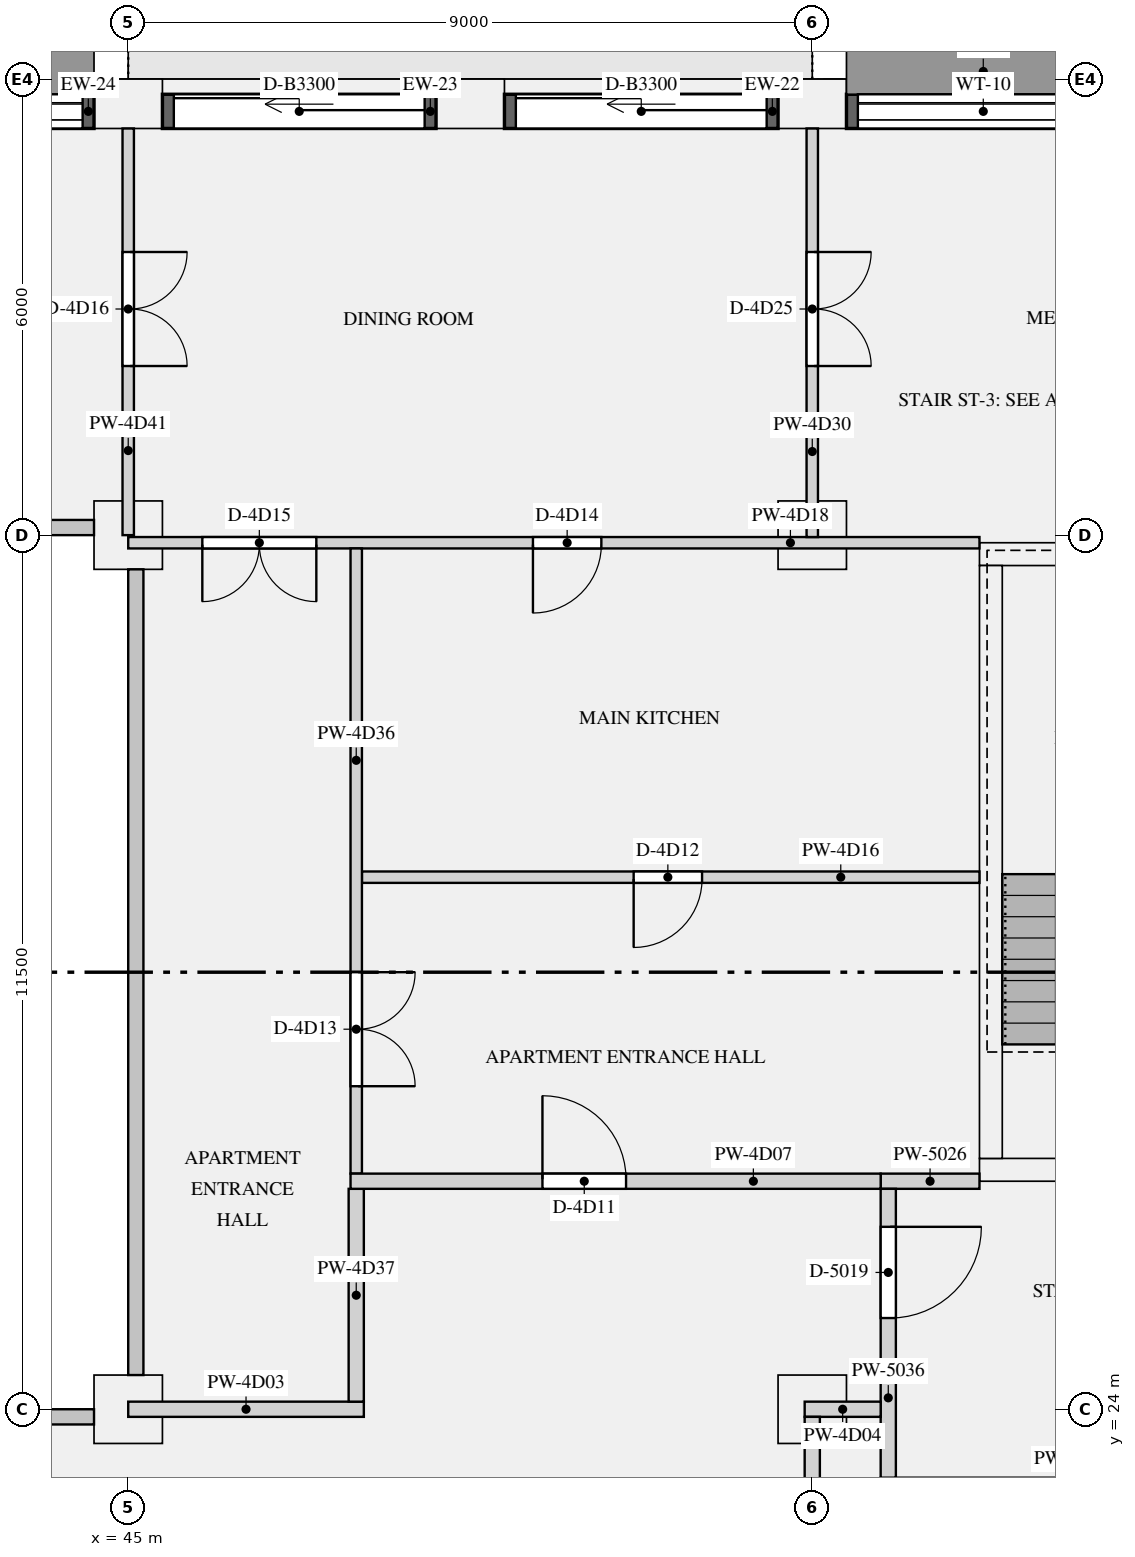
"""IFC4 building model, lengths in metres.
Left out: names, types, materials, properties, quantities, classifications, styles, units other than length and angle.
Written with IfcOpenShell. Run it as: python <this file> out.ifc"""

import sys

from ifc_helpers import new_model, si_unit, direction, frame, frame_2d, origin, origin_2d, place, context, subcontext, project, spatial, rectangle, extrude, element, fill, save


model = new_model("IFC4")
c1 = context("Model", 3, precision=1e-05, world=origin(), true_north=direction((0.0, 1.0)))
c2 = subcontext(c1, "Body", "Model", "MODEL_VIEW")
j1 = project(units=[si_unit("LENGTHUNIT", "METRE"), si_unit("PLANEANGLEUNIT", "RADIAN")], contexts=[c1])
p1 = place(None, origin())
s1 = spatial("IfcSite", under=j1, at=p1, CompositionType="ELEMENT")
p2 = place(p1, origin())
s2 = spatial("IfcBuilding", under=s1, at=p2, CompositionType="ELEMENT")
p3 = place(p2, frame((0.0, 0.0, 223.2)))
s3 = spatial("IfcBuildingStorey", under=s2, at=p3, CompositionType="ELEMENT", Elevation=223.2)
for number, where, z_axis, x_axis in (
    (1, (54.0, 41.175, 0.0), (0.0, 0.0, 1.0), (-1.0, 0.0, 0.0)),
    (2, (49.5, 41.175, 0.0), (0.0, 0.0, 1.0), (-1.0, 0.0, 0.0)),
    (3, (45.0, 41.175, 0.0), (0.0, 0.0, 1.0), (-1.0, 0.0, 0.0)),
):
    element("IfcColumn", number, at=place(p3, frame(where, z_axis=z_axis, x_axis=x_axis)), inside=s3, PredefinedType="USERDEFINED", context=c2, shape_type="SweptSolid", body=[
        extrude(rectangle(XDim=0.9, YDim=0.65, at=origin_2d()), origin(), (0.0, 0.0, 1.0), 3.15),
    ])
for number, where, z_axis, x_axis in (
    (4, (45.0, 24.0, 0.0), (0.0, 0.0, 1.0), (1.0, 0.0, 0.0)),
    (5, (54.0, 24.0, 0.0), (0.0, 0.0, 1.0), (1.0, 0.0, 0.0)),
    (6, (45.0, 35.5, 0.0), (0.0, 0.0, 1.0), (1.0, 0.0, 0.0)),
    (7, (54.0, 35.5, 0.0), (0.0, 0.0, 1.0), (1.0, 0.0, 0.0)),
):
    element("IfcColumn", number, at=place(p3, frame(where, z_axis=z_axis, x_axis=x_axis)), inside=s3, PredefinedType="COLUMN", context=c2, shape_type="SweptSolid", body=[
        extrude(rectangle(XDim=0.9, YDim=0.9, at=origin_2d()), origin(), (0.0, 0.0, 1.0), 3.15),
    ])
p4 = place(p3, frame((56.2, 27.15, 0.0), z_axis=(0.0, 0.0, 1.0), x_axis=(1.0, 0.0, 0.0)))
e8 = element("IfcWall", 8, at=p4, inside=s3, PredefinedType="SHEAR", context=c2, shape_type="SweptSolid", body=[
    extrude(rectangle(XDim=3.6, YDim=0.3, at=frame_2d((1.8, 0.0))), origin(), (0.0, 0.0, 1.0), 3.15),
])
p5 = place(p4, frame((1.25, 0.0, 0.0)))
e9 = element("IfcOpeningElement", 9, at=p5, cuts=e8, PredefinedType="OPENING", context=c2, shape_type="SweptSolid", body=[
    extrude(rectangle(XDim=1.1, YDim=2.1, at=frame_2d((0.55, 1.05))), frame((0.0, 0.16, 0.0), z_axis=(0.0, -1.0, 0.0), x_axis=(1.0, 0.0, 0.0)), (0.0, 0.0, 1.0), 0.32),
])
p6 = place(p3, frame((56.2, 35.25, 0.0), z_axis=(0.0, 0.0, 1.0), x_axis=(1.0, 0.0, 0.0)))
e10 = element("IfcWall", 10, at=p6, inside=s3, PredefinedType="SHEAR", context=c2, shape_type="SweptSolid", body=[
    extrude(rectangle(XDim=3.6, YDim=0.3, at=frame_2d((1.8, 0.0))), origin(), (0.0, 0.0, 1.0), 3.15),
])
p7 = place(p3, frame((56.35, 27.3, 0.0), z_axis=(0.0, 0.0, 1.0), x_axis=(0.0, 1.0, 0.0)))
e11 = element("IfcWall", 11, at=p7, inside=s3, PredefinedType="SHEAR", context=c2, shape_type="SweptSolid", body=[
    extrude(rectangle(XDim=7.8, YDim=0.3, at=frame_2d((3.9, 0.0))), origin(), (0.0, 0.0, 1.0), 3.15),
])
p8 = place(p3, frame((58.05, 41.075, 0.9), z_axis=(0.0, 0.0, 1.0), x_axis=(-1.0, 0.0, 0.0)))
e12 = element("IfcWall", 12, at=p8, inside=s3, PredefinedType="SOLIDWALL", context=c2, shape_type="SweptSolid", body=[
    extrude(rectangle(XDim=3.6, YDim=0.45, at=frame_2d((1.8, 0.0))), origin(), (0.0, 0.0, 1.0), 1.93),
])
p9 = place(p8, frame((0.15, 0.0, 0.15)))
e13 = element("IfcOpeningElement", 13, at=p9, cuts=e12, PredefinedType="OPENING", context=c2, shape_type="SweptSolid", body=[
    extrude(rectangle(XDim=3.3, YDim=1.5, at=frame_2d((1.65, 0.75))), frame((0.0, 0.235, 0.0), z_axis=(0.0, -1.0, 0.0), x_axis=(1.0, 0.0, 0.0)), (0.0, 0.0, 1.0), 0.47),
])
p10 = place(p3, frame((53.55, 41.075, 0.0), z_axis=(0.0, 0.0, 1.0), x_axis=(-1.0, 0.0, 0.0)))
e14 = element("IfcWall", 14, at=p10, inside=s3, PredefinedType="SOLIDWALL", context=c2, shape_type="SweptSolid", body=[
    extrude(rectangle(XDim=3.6, YDim=0.45, at=frame_2d((1.8, 0.0))), origin(), (0.0, 0.0, 1.0), 2.83),
])
p11 = place(p10, frame((0.15, 0.0, 0.0)))
e15 = element("IfcOpeningElement", 15, at=p11, cuts=e14, PredefinedType="OPENING", context=c2, shape_type="SweptSolid", body=[
    extrude(rectangle(XDim=3.3, YDim=2.3, at=frame_2d((1.65, 1.15))), frame((0.0, 0.235, 0.0), z_axis=(0.0, -1.0, 0.0), x_axis=(1.0, 0.0, 0.0)), (0.0, 0.0, 1.0), 0.47),
])
p12 = place(p3, frame((49.05, 41.075, 0.0), z_axis=(0.0, 0.0, 1.0), x_axis=(-1.0, 0.0, 0.0)))
e16 = element("IfcWall", 16, at=p12, inside=s3, PredefinedType="SOLIDWALL", context=c2, shape_type="SweptSolid", body=[
    extrude(rectangle(XDim=3.6, YDim=0.45, at=frame_2d((1.8, 0.0))), origin(), (0.0, 0.0, 1.0), 2.83),
])
p13 = place(p12, frame((0.15, 0.0, 0.0)))
e17 = element("IfcOpeningElement", 17, at=p13, cuts=e16, PredefinedType="OPENING", context=c2, shape_type="SweptSolid", body=[
    extrude(rectangle(XDim=3.3, YDim=2.3, at=frame_2d((1.65, 1.15))), frame((0.0, 0.235, 0.0), z_axis=(0.0, -1.0, 0.0), x_axis=(1.0, 0.0, 0.0)), (0.0, 0.0, 1.0), 0.47),
])
p14 = place(p3, frame((44.55, 41.075, 0.9), z_axis=(0.0, 0.0, 1.0), x_axis=(-1.0, 0.0, 0.0)))
e18 = element("IfcWall", 18, at=p14, inside=s3, PredefinedType="SOLIDWALL", context=c2, shape_type="SweptSolid", body=[
    extrude(rectangle(XDim=3.6, YDim=0.45, at=frame_2d((1.8, 0.0))), origin(), (0.0, 0.0, 1.0), 1.93),
])
p15 = place(p14, frame((0.15, 0.0, 0.15)))
e19 = element("IfcOpeningElement", 19, at=p15, cuts=e18, PredefinedType="OPENING", context=c2, shape_type="SweptSolid", body=[
    extrude(rectangle(XDim=3.3, YDim=1.5, at=frame_2d((1.65, 0.75))), frame((0.0, 0.235, 0.0), z_axis=(0.0, -1.0, 0.0), x_axis=(1.0, 0.0, 0.0)), (0.0, 0.0, 1.0), 0.47),
])
p16 = place(p3, frame((54.9, 27.0, 0.0), z_axis=(0.0, 0.0, 1.0), x_axis=(1.0, 0.0, 0.0)))
e20 = element("IfcWall", 20, at=p16, inside=s3, PredefinedType="PARTITIONING", context=c2, shape_type="SweptSolid", body=[
    extrude(rectangle(XDim=1.3, YDim=0.2, at=frame_2d((0.65, 0.0))), origin(), (0.0, 0.0, 1.0), 2.83),
])
p17 = place(p3, frame((55.0, 23.1, 0.0), z_axis=(0.0, 0.0, 1.0), x_axis=(0.0, 1.0, 0.0)))
e21 = element("IfcWall", 21, at=p17, inside=s3, PredefinedType="PARTITIONING", context=c2, shape_type="SweptSolid", body=[
    extrude(rectangle(XDim=3.8, YDim=0.2, at=frame_2d((1.9, 0.0))), origin(), (0.0, 0.0, 1.0), 2.83),
])
p18 = place(p17, frame((2.1, 0.0, 0.0)))
e22 = element("IfcOpeningElement", 22, at=p18, cuts=e21, PredefinedType="OPENING", context=c2, shape_type="SweptSolid", body=[
    extrude(rectangle(XDim=1.2, YDim=2.1, at=frame_2d((0.6, 1.05))), frame((0.0, 0.11, 0.0), z_axis=(0.0, -1.0, 0.0), x_axis=(1.0, 0.0, 0.0)), (0.0, 0.0, 1.0), 0.22),
])
p19 = place(p3, frame((45.0, 24.0, 0.0), z_axis=(0.0, 0.0, 1.0), x_axis=(1.0, 0.0, 0.0)))
e23 = element("IfcWall", 23, at=p19, inside=s3, PredefinedType="PARTITIONING", context=c2, shape_type="SweptSolid", body=[
    extrude(rectangle(XDim=3.1, YDim=0.2, at=frame_2d((1.55, 0.0))), origin(), (0.0, 0.0, 1.0), 2.83),
])
p20 = place(p3, frame((53.9, 24.0, 0.0), z_axis=(0.0, 0.0, 1.0), x_axis=(1.0, 0.0, 0.0)))
e24 = element("IfcWall", 24, at=p20, inside=s3, PredefinedType="PARTITIONING", context=c2, shape_type="SweptSolid", body=[
    extrude(rectangle(XDim=1.0, YDim=0.2, at=frame_2d((0.5, 0.0))), origin(), (0.0, 0.0, 1.0), 2.83),
])
p21 = place(p3, frame((47.925, 27.0, 0.0), z_axis=(0.0, 0.0, 1.0), x_axis=(1.0, 0.0, 0.0)))
e25 = element("IfcWall", 25, at=p21, inside=s3, PredefinedType="PARTITIONING", context=c2, shape_type="SweptSolid", body=[
    extrude(rectangle(XDim=6.975, YDim=0.2, at=frame_2d((3.487, 0.0))), origin(), (0.0, 0.0, 1.0), 2.83),
])
p22 = place(p21, frame((2.525, 0.0, 0.0)))
e26 = element("IfcOpeningElement", 26, at=p22, cuts=e25, PredefinedType="OPENING", context=c2, shape_type="SweptSolid", body=[
    extrude(rectangle(XDim=1.1, YDim=2.1, at=frame_2d((0.55, 1.05))), frame((0.0, 0.11, 0.0), z_axis=(0.0, -1.0, 0.0), x_axis=(1.0, 0.0, 0.0)), (0.0, 0.0, 1.0), 0.22),
])
p23 = place(p3, frame((48.075, 31.0, 0.0), z_axis=(0.0, 0.0, 1.0), x_axis=(1.0, 0.0, 0.0)))
e27 = element("IfcWall", 27, at=p23, inside=s3, PredefinedType="PARTITIONING", context=c2, shape_type="SweptSolid", body=[
    extrude(rectangle(XDim=8.125, YDim=0.15, at=frame_2d((4.062, 0.0))), origin(), (0.0, 0.0, 1.0), 2.83),
])
p24 = place(p23, frame((3.575, 0.0, 0.0)))
e28 = element("IfcOpeningElement", 28, at=p24, cuts=e27, PredefinedType="OPENING", context=c2, shape_type="SweptSolid", body=[
    extrude(rectangle(XDim=0.9, YDim=2.1, at=frame_2d((0.45, 1.05))), frame((0.0, 0.085, 0.0), z_axis=(0.0, -1.0, 0.0), x_axis=(1.0, 0.0, 0.0)), (0.0, 0.0, 1.0), 0.17),
])
p25 = place(p3, frame((45.0, 35.4, 0.0), z_axis=(0.0, 0.0, 1.0), x_axis=(1.0, 0.0, 0.0)))
e29 = element("IfcWall", 29, at=p25, inside=s3, PredefinedType="PARTITIONING", context=c2, shape_type="SweptSolid", body=[
    extrude(rectangle(XDim=11.2, YDim=0.15, at=frame_2d((5.6, 0.0))), origin(), (0.0, 0.0, 1.0), 2.83),
])
p26 = place(p25, frame((5.325, 0.0, 0.0)))
e30 = element("IfcOpeningElement", 30, at=p26, cuts=e29, PredefinedType="OPENING", context=c2, shape_type="SweptSolid", body=[
    extrude(rectangle(XDim=0.9, YDim=2.1, at=frame_2d((0.45, 1.05))), frame((0.0, 0.085, 0.0), z_axis=(0.0, -1.0, 0.0), x_axis=(1.0, 0.0, 0.0)), (0.0, 0.0, 1.0), 0.17),
])
p27 = place(p25, frame((0.975, 0.0, 0.0)))
e31 = element("IfcOpeningElement", 31, at=p27, cuts=e29, PredefinedType="OPENING", context=c2, shape_type="SweptSolid", body=[
    extrude(rectangle(XDim=1.5, YDim=2.1, at=frame_2d((0.75, 1.05))), frame((0.0, 0.085, 0.0), z_axis=(0.0, -1.0, 0.0), x_axis=(1.0, 0.0, 0.0)), (0.0, 0.0, 1.0), 0.17),
])
p28 = place(p3, frame((54.0, 35.475, 0.0), z_axis=(0.0, 0.0, 1.0), x_axis=(0.0, 1.0, 0.0)))
e32 = element("IfcWall", 32, at=p28, inside=s3, PredefinedType="PARTITIONING", context=c2, shape_type="SweptSolid", body=[
    extrude(rectangle(XDim=5.375, YDim=0.15, at=frame_2d((2.688, 0.0))), origin(), (0.0, 0.0, 1.0), 2.83),
])
p29 = place(p28, frame((2.25, 0.0, 0.0)))
e33 = element("IfcOpeningElement", 33, at=p29, cuts=e32, PredefinedType="OPENING", context=c2, shape_type="SweptSolid", body=[
    extrude(rectangle(XDim=1.5, YDim=2.1, at=frame_2d((0.75, 1.05))), frame((0.0, 0.085, 0.0), z_axis=(0.0, -1.0, 0.0), x_axis=(1.0, 0.0, 0.0)), (0.0, 0.0, 1.0), 0.17),
])
p30 = place(p3, frame((54.0, 16.1, 0.0), z_axis=(0.0, 0.0, 1.0), x_axis=(0.0, 1.0, 0.0)))
e34 = element("IfcWall", 34, at=p30, inside=s3, PredefinedType="PARTITIONING", context=c2, shape_type="SweptSolid", body=[
    extrude(rectangle(XDim=7.8, YDim=0.2, at=frame_2d((3.9, 0.0))), origin(), (0.0, 0.0, 1.0), 2.83),
])
p31 = place(p30, frame((1.85, 0.0, 0.0)))
e35 = element("IfcOpeningElement", 35, at=p31, cuts=e34, PredefinedType="OPENING", context=c2, shape_type="SweptSolid", body=[
    extrude(rectangle(XDim=1.1, YDim=2.1, at=frame_2d((0.55, 1.05))), frame((0.0, 0.11, 0.0), z_axis=(0.0, -1.0, 0.0), x_axis=(1.0, 0.0, 0.0)), (0.0, 0.0, 1.0), 0.22),
])
p32 = place(p3, frame((48.0, 27.1, 0.0), z_axis=(0.0, 0.0, 1.0), x_axis=(0.0, 1.0, 0.0)))
e36 = element("IfcWall", 36, at=p32, inside=s3, PredefinedType="PARTITIONING", context=c2, shape_type="SweptSolid", body=[
    extrude(rectangle(XDim=8.225, YDim=0.15, at=frame_2d((4.112, 0.0))), origin(), (0.0, 0.0, 1.0), 2.83),
])
p33 = place(p32, frame((1.15, 0.0, 0.0)))
e37 = element("IfcOpeningElement", 37, at=p33, cuts=e36, PredefinedType="OPENING", context=c2, shape_type="SweptSolid", body=[
    extrude(rectangle(XDim=1.5, YDim=2.1, at=frame_2d((0.75, 1.05))), frame((0.0, 0.085, 0.0), z_axis=(0.0, -1.0, 0.0), x_axis=(1.0, 0.0, 0.0)), (0.0, 0.0, 1.0), 0.17),
])
p34 = place(p3, frame((48.0, 24.1, 0.0), z_axis=(0.0, 0.0, 1.0), x_axis=(0.0, 1.0, 0.0)))
e38 = element("IfcWall", 38, at=p34, inside=s3, PredefinedType="PARTITIONING", context=c2, shape_type="SweptSolid", body=[
    extrude(rectangle(XDim=2.8, YDim=0.2, at=frame_2d((1.4, 0.0))), origin(), (0.0, 0.0, 1.0), 2.83),
])
p35 = place(p3, frame((45.0, 35.5, 0.0), z_axis=(0.0, 0.0, 1.0), x_axis=(0.0, 1.0, 0.0)))
e39 = element("IfcWall", 39, at=p35, inside=s3, PredefinedType="PARTITIONING", context=c2, shape_type="SweptSolid", body=[
    extrude(rectangle(XDim=5.35, YDim=0.15, at=frame_2d((2.675, 0.0))), origin(), (0.0, 0.0, 1.0), 2.83),
])
p36 = place(p35, frame((2.225, 0.0, 0.0)))
e40 = element("IfcOpeningElement", 40, at=p36, cuts=e39, PredefinedType="OPENING", context=c2, shape_type="SweptSolid", body=[
    extrude(rectangle(XDim=1.5, YDim=2.1, at=frame_2d((0.75, 1.05))), frame((0.0, 0.085, 0.0), z_axis=(0.0, -1.0, 0.0), x_axis=(1.0, 0.0, 0.0)), (0.0, 0.0, 1.0), 0.17),
])
p37 = place(p9, origin())
e41 = element("IfcWindow", 41, at=p37, inside=s3, PartitioningType="SINGLE_PANEL", PredefinedType="WINDOW", context=c2, shape_type="SweptSolid", body=[
    extrude(rectangle(XDim=3.3, YDim=1.5, at=frame_2d((1.65, 0.75))), frame((0.0, -0.065, 0.0), z_axis=(0.0, -1.0, 0.0), x_axis=(1.0, 0.0, 0.0)), (0.0, 0.0, 1.0), 0.06),
])
fill(e13, e41)
p38 = place(p11, origin())
e42 = element("IfcDoor", 42, at=p38, inside=s3, OperationType="SLIDING_TO_LEFT", PredefinedType="DOOR", context=c2, shape_type="SweptSolid", body=[
    extrude(rectangle(XDim=3.3, YDim=2.3, at=frame_2d((1.65, 1.15))), frame((0.0, -0.07, 0.0), z_axis=(0.0, -1.0, 0.0), x_axis=(1.0, 0.0, 0.0)), (0.0, 0.0, 1.0), 0.05),
])
fill(e15, e42)
p39 = place(p13, origin())
e43 = element("IfcDoor", 43, at=p39, inside=s3, OperationType="SLIDING_TO_LEFT", PredefinedType="DOOR", context=c2, shape_type="SweptSolid", body=[
    extrude(rectangle(XDim=3.3, YDim=2.3, at=frame_2d((1.65, 1.15))), frame((0.0, -0.07, 0.0), z_axis=(0.0, -1.0, 0.0), x_axis=(1.0, 0.0, 0.0)), (0.0, 0.0, 1.0), 0.05),
])
fill(e17, e43)
p40 = place(p15, origin())
e44 = element("IfcWindow", 44, at=p40, inside=s3, PartitioningType="SINGLE_PANEL", PredefinedType="WINDOW", context=c2, shape_type="SweptSolid", body=[
    extrude(rectangle(XDim=3.3, YDim=1.5, at=frame_2d((1.65, 0.75))), frame((0.0, -0.065, 0.0), z_axis=(0.0, -1.0, 0.0), x_axis=(1.0, 0.0, 0.0)), (0.0, 0.0, 1.0), 0.06),
])
fill(e19, e44)
p41 = place(p18, frame((1.2, 0.0, 0.0), z_axis=(0.0, 0.0, 1.0), x_axis=(-1.0, 0.0, 0.0)))
e45 = element("IfcDoor", 45, at=p41, inside=s3, OperationType="SINGLE_SWING_LEFT", PredefinedType="DOOR", context=c2, shape_type="SweptSolid", body=[
    extrude(rectangle(XDim=1.2, YDim=2.1, at=frame_2d((0.6, 1.05))), frame((0.0, 0.025, 0.0), z_axis=(0.0, -1.0, 0.0), x_axis=(1.0, 0.0, 0.0)), (0.0, 0.0, 1.0), 0.05),
])
fill(e22, e45)
p42 = place(p22, origin())
e46 = element("IfcDoor", 46, at=p42, inside=s3, OperationType="SINGLE_SWING_LEFT", PredefinedType="DOOR", context=c2, shape_type="SweptSolid", body=[
    extrude(rectangle(XDim=1.1, YDim=2.1, at=frame_2d((0.55, 1.05))), frame((0.0, 0.025, 0.0), z_axis=(0.0, -1.0, 0.0), x_axis=(1.0, 0.0, 0.0)), (0.0, 0.0, 1.0), 0.05),
])
fill(e26, e46)
p43 = place(p24, frame((0.9, 0.0, 0.0), z_axis=(0.0, 0.0, 1.0), x_axis=(-1.0, 0.0, 0.0)))
e47 = element("IfcDoor", 47, at=p43, inside=s3, OperationType="SINGLE_SWING_RIGHT", PredefinedType="DOOR", context=c2, shape_type="SweptSolid", body=[
    extrude(rectangle(XDim=0.9, YDim=2.1, at=frame_2d((0.45, 1.05))), frame((0.0, 0.025, 0.0), z_axis=(0.0, -1.0, 0.0), x_axis=(1.0, 0.0, 0.0)), (0.0, 0.0, 1.0), 0.05),
])
fill(e28, e47)
p44 = place(p33, frame((1.5, 0.0, 0.0), z_axis=(0.0, 0.0, 1.0), x_axis=(-1.0, 0.0, 0.0)))
e48 = element("IfcDoor", 48, at=p44, inside=s3, OperationType="DOUBLE_DOOR_SINGLE_SWING", PredefinedType="DOOR", context=c2, shape_type="SweptSolid", body=[
    extrude(rectangle(XDim=1.5, YDim=2.1, at=frame_2d((0.75, 1.05))), frame((0.0, 0.025, 0.0), z_axis=(0.0, -1.0, 0.0), x_axis=(1.0, 0.0, 0.0)), (0.0, 0.0, 1.0), 0.05),
])
fill(e37, e48)
p45 = place(p26, frame((0.9, 0.0, 0.0), z_axis=(0.0, 0.0, 1.0), x_axis=(-1.0, 0.0, 0.0)))
e49 = element("IfcDoor", 49, at=p45, inside=s3, OperationType="SINGLE_SWING_RIGHT", PredefinedType="DOOR", context=c2, shape_type="SweptSolid", body=[
    extrude(rectangle(XDim=0.9, YDim=2.1, at=frame_2d((0.45, 1.05))), frame((0.0, 0.025, 0.0), z_axis=(0.0, -1.0, 0.0), x_axis=(1.0, 0.0, 0.0)), (0.0, 0.0, 1.0), 0.05),
])
fill(e30, e49)
p46 = place(p27, frame((1.5, 0.0, 0.0), z_axis=(0.0, 0.0, 1.0), x_axis=(-1.0, 0.0, 0.0)))
e50 = element("IfcDoor", 50, at=p46, inside=s3, OperationType="DOUBLE_DOOR_SINGLE_SWING", PredefinedType="DOOR", context=c2, shape_type="SweptSolid", body=[
    extrude(rectangle(XDim=1.5, YDim=2.1, at=frame_2d((0.75, 1.05))), frame((0.0, 0.025, 0.0), z_axis=(0.0, -1.0, 0.0), x_axis=(1.0, 0.0, 0.0)), (0.0, 0.0, 1.0), 0.05),
])
fill(e31, e50)
p47 = place(p36, frame((1.5, 0.0, 0.0), z_axis=(0.0, 0.0, 1.0), x_axis=(-1.0, 0.0, 0.0)))
e51 = element("IfcDoor", 51, at=p47, inside=s3, OperationType="DOUBLE_DOOR_SINGLE_SWING", PredefinedType="DOOR", context=c2, shape_type="SweptSolid", body=[
    extrude(rectangle(XDim=1.5, YDim=2.1, at=frame_2d((0.75, 1.05))), frame((0.0, 0.025, 0.0), z_axis=(0.0, -1.0, 0.0), x_axis=(1.0, 0.0, 0.0)), (0.0, 0.0, 1.0), 0.05),
])
fill(e40, e51)
p48 = place(p29, frame((1.5, 0.0, 0.0), z_axis=(0.0, 0.0, 1.0), x_axis=(-1.0, 0.0, 0.0)))
e52 = element("IfcDoor", 52, at=p48, inside=s3, OperationType="DOUBLE_DOOR_SINGLE_SWING", PredefinedType="DOOR", context=c2, shape_type="SweptSolid", body=[
    extrude(rectangle(XDim=1.5, YDim=2.1, at=frame_2d((0.75, 1.05))), frame((0.0, 0.025, 0.0), z_axis=(0.0, -1.0, 0.0), x_axis=(1.0, 0.0, 0.0)), (0.0, 0.0, 1.0), 0.05),
])
fill(e33, e52)
save(model, sys.argv[1])
